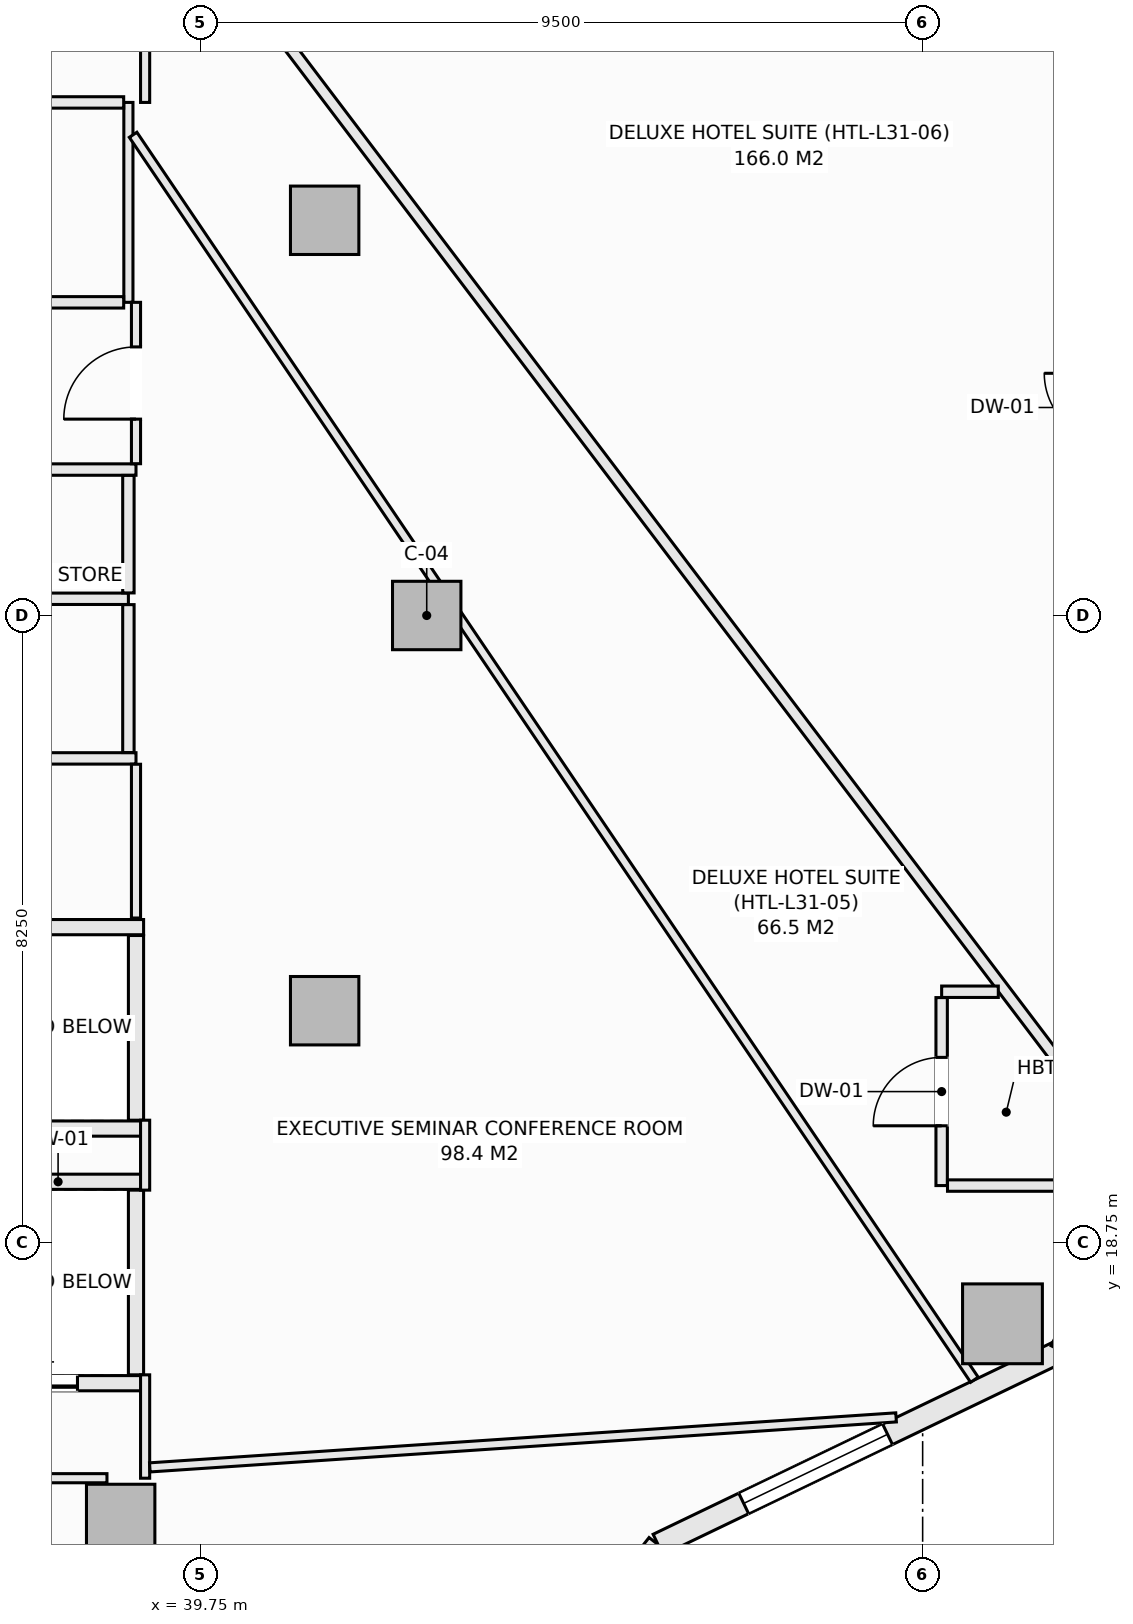
"""IFC4 building model, lengths in metres.
Left out: names, types, materials, properties, quantities, classifications, styles, units other than length and angle.
Written with IfcOpenShell. Run it as: python <this file> out.ifc"""

import sys

from ifc_helpers import new_model, si_unit, direction, frame, frame_2d, origin, origin_2d, place, context, subcontext, project, spatial, rectangle, extrude, element, fill, save


model = new_model("IFC4")
c1 = context("Model", 3, precision=1e-05, world=origin(), true_north=direction((0.0, 1.0)))
c2 = subcontext(c1, "Body", "Model", "MODEL_VIEW")
j1 = project(units=[si_unit("LENGTHUNIT", "METRE"), si_unit("PLANEANGLEUNIT", "RADIAN")], contexts=[c1])
p1 = place(None, origin())
s1 = spatial("IfcSite", under=j1, at=p1, CompositionType="ELEMENT")
p2 = place(p1, origin())
s2 = spatial("IfcBuilding", under=s1, at=p2, CompositionType="ELEMENT")
p3 = place(p2, frame((0.0, 0.0, 125.7)))
s3 = spatial("IfcBuildingStorey", under=s2, at=p3, CompositionType="ELEMENT", Elevation=125.7)
p4 = place(p3, frame((50.3, 17.681, -0.27), z_axis=(0.0, 0.0, 1.0), x_axis=(1.0, 0.0, 0.0)))
e1 = element("IfcColumn", 1, at=p4, inside=s3, PredefinedType="COLUMN", context=c2, shape_type="SweptSolid", body=[
    extrude(rectangle(XDim=1.05, YDim=1.05, at=origin_2d()), origin(), (0.0, 0.0, 1.0), 3.4),
])
for number, where, z_axis, x_axis in (
    (2, (42.725, 27.0, -0.27), (0.0, 0.0, 1.0), (1.0, 0.0, 0.0)),
    (3, (41.382, 32.199, -0.27), (0.0, 0.0, 1.0), (1.0, 0.0, 0.0)),
    (4, (38.698, 15.121, -0.27), (0.0, 0.0, 1.0), (1.0, 0.0, 0.0)),
    (5, (41.382, 21.801, -0.27), (0.0, 0.0, 1.0), (1.0, 0.0, 0.0)),
):
    element("IfcColumn", number, at=place(p3, frame(where, z_axis=z_axis, x_axis=x_axis)), inside=s3, PredefinedType="COLUMN", context=c2, shape_type="SweptSolid", body=[
        extrude(rectangle(XDim=0.9, YDim=0.9, at=origin_2d()), origin(), (0.0, 0.0, 1.0), 3.4),
    ])
p5 = place(p3, frame((51.072, 36.675, 0.0), z_axis=(0.0, 0.0, 1.0), x_axis=(0.459767899643, -0.888039119892, 0.0)))
e6 = element("IfcWall", 6, at=p5, inside=s3, PredefinedType="SOLIDWALL", context=c2, shape_type="SweptSolid", body=[
    extrude(rectangle(XDim=5.255, YDim=0.3, at=frame_2d((2.628, 0.0))), origin(), (0.0, 0.0, 1.0), 2.653),
])
p6 = place(p5, frame((1.578, 0.0, 0.74)))
e7 = element("IfcOpeningElement", 7, at=p6, cuts=e6, PredefinedType="OPENING", context=c2, shape_type="SweptSolid", body=[
    extrude(rectangle(XDim=2.1, YDim=1.7, at=frame_2d((1.05, 0.85))), frame((0.0, 0.16, 0.0), z_axis=(0.0, -1.0, 0.0), x_axis=(1.0, 0.0, 0.0)), (0.0, 0.0, 1.0), 0.32),
])
p7 = place(p3, frame((42.219, 10.242, 0.0), z_axis=(0.0, 0.0, 1.0), x_axis=(0.616435134162, 0.787405693001, 0.0)))
e8 = element("IfcWall", 8, at=p7, inside=s3, PredefinedType="SOLIDWALL", context=c2, shape_type="SweptSolid", body=[
    extrude(rectangle(XDim=5.759, YDim=0.3, at=frame_2d((2.879, 0.0))), origin(), (0.0, 0.0, 1.0), 2.653),
])
p8 = place(p7, frame((1.829, 0.0, 0.74)))
e9 = element("IfcOpeningElement", 9, at=p8, cuts=e8, PredefinedType="OPENING", context=c2, shape_type="SweptSolid", body=[
    extrude(rectangle(XDim=2.1, YDim=1.7, at=frame_2d((1.05, 0.85))), frame((0.0, 0.16, 0.0), z_axis=(0.0, -1.0, 0.0), x_axis=(1.0, 0.0, 0.0)), (0.0, 0.0, 1.0), 0.32),
])
p9 = place(p3, frame((45.769, 14.777, 0.0), z_axis=(0.0, 0.0, 1.0), x_axis=(0.901370184739, 0.433049408339, 0.0)))
e10 = element("IfcWall", 10, at=p9, inside=s3, PredefinedType="SOLIDWALL", context=c2, shape_type="SweptSolid", body=[
    extrude(rectangle(XDim=5.884, YDim=0.3, at=frame_2d((2.942, 0.0))), origin(), (0.0, 0.0, 1.0), 2.653),
])
p10 = place(p9, frame((1.25, 0.0, 0.74)))
e11 = element("IfcOpeningElement", 11, at=p10, cuts=e10, PredefinedType="OPENING", context=c2, shape_type="SweptSolid", body=[
    extrude(rectangle(XDim=2.1, YDim=1.7, at=frame_2d((1.05, 0.85))), frame((0.0, 0.16, 0.0), z_axis=(0.0, -1.0, 0.0), x_axis=(1.0, 0.0, 0.0)), (0.0, 0.0, 1.0), 0.32),
])
p11 = place(p3, frame((51.072, 17.325, 0.0), z_axis=(0.0, 0.0, 1.0), x_axis=(0.459767899643, 0.888039119892, 0.0)))
e12 = element("IfcWall", 12, at=p11, inside=s3, PredefinedType="SOLIDWALL", context=c2, shape_type="SweptSolid", body=[
    extrude(rectangle(XDim=5.255, YDim=0.3, at=frame_2d((2.628, 0.0))), origin(), (0.0, 0.0, 1.0), 2.653),
])
p12 = place(p11, frame((2.98, 0.0, 0.72)))
e13 = element("IfcOpeningElement", 13, at=p12, cuts=e12, PredefinedType="OPENING", context=c2, shape_type="SweptSolid", body=[
    extrude(rectangle(XDim=1.2, YDim=1.65, at=frame_2d((0.6, 0.825))), frame((0.0, 0.16, 0.0), z_axis=(0.0, -1.0, 0.0), x_axis=(1.0, 0.0, 0.0)), (0.0, 0.0, 1.0), 0.32),
])
p13 = place(p11, frame((0.22, 0.0, 0.72)))
e14 = element("IfcOpeningElement", 14, at=p13, cuts=e12, PredefinedType="OPENING", context=c2, shape_type="SweptSolid", body=[
    extrude(rectangle(XDim=1.2, YDim=1.65, at=frame_2d((0.6, 0.825))), frame((0.0, 0.16, 0.0), z_axis=(0.0, -1.0, 0.0), x_axis=(1.0, 0.0, 0.0)), (0.0, 0.0, 1.0), 0.32),
])
p14 = place(p3, frame((36.75, 19.55, 0.0), z_axis=(0.0, 0.0, 1.0), x_axis=(1.0, 0.0, 0.0)))
e15 = element("IfcWall", 15, at=p14, inside=s3, PredefinedType="SOLIDWALL", context=c2, shape_type="SweptSolid", body=[
    extrude(rectangle(XDim=2.25, YDim=0.2, at=frame_2d((1.125, 0.0))), origin(), (0.0, 0.0, 1.0), 3.13),
])
p15 = place(p3, frame((36.75, 16.9, 0.0), z_axis=(0.0, 0.0, 1.0), x_axis=(1.0, 0.0, 0.0)))
e16 = element("IfcWall", 16, at=p15, inside=s3, PredefinedType="SOLIDWALL", context=c2, shape_type="SweptSolid", body=[
    extrude(rectangle(XDim=2.25, YDim=0.2, at=frame_2d((1.125, 0.0))), origin(), (0.0, 0.0, 1.0), 3.13),
])
p16 = place(p15, frame((0.28, 0.0, 0.0)))
e17 = element("IfcOpeningElement", 17, at=p16, cuts=e16, PredefinedType="OPENING", context=c2, shape_type="SweptSolid", body=[
    extrude(rectangle(XDim=1.1, YDim=2.2, at=frame_2d((0.55, 1.1))), frame((0.0, 0.11, 0.0), z_axis=(0.0, -1.0, 0.0), x_axis=(1.0, 0.0, 0.0)), (0.0, 0.0, 1.0), 0.22),
])
p17 = place(p3, frame((38.9, 17.01, 0.0), z_axis=(0.0, 0.0, 1.0), x_axis=(0.0, 1.0, 0.0)))
e18 = element("IfcWall", 18, at=p17, inside=s3, PredefinedType="SOLIDWALL", context=c2, shape_type="SweptSolid", body=[
    extrude(rectangle(XDim=2.43, YDim=0.2, at=frame_2d((1.215, 0.0))), origin(), (0.0, 0.0, 1.0), 3.13),
])
for number, where, z_axis, x_axis in (
    (19, (36.75, 22.9, 0.0), (0.0, 0.0, 1.0), (1.0, 0.0, 0.0)),
    (20, (36.75, 20.25, 0.0), (0.0, 0.0, 1.0), (1.0, 0.0, 0.0)),
):
    element("IfcWall", number, at=place(p3, frame(where, z_axis=z_axis, x_axis=x_axis)), inside=s3, PredefinedType="SOLIDWALL", context=c2, shape_type="SweptSolid", body=[
        extrude(rectangle(XDim=2.25, YDim=0.2, at=frame_2d((1.125, 0.0))), origin(), (0.0, 0.0, 1.0), 3.13),
    ])
p18 = place(p3, frame((38.9, 20.36, 0.0), z_axis=(0.0, 0.0, 1.0), x_axis=(0.0, 1.0, 0.0)))
e21 = element("IfcWall", 21, at=p18, inside=s3, PredefinedType="SOLIDWALL", context=c2, shape_type="SweptSolid", body=[
    extrude(rectangle(XDim=2.43, YDim=0.2, at=frame_2d((1.215, 0.0))), origin(), (0.0, 0.0, 1.0), 3.13),
])
p19 = place(p3, frame((30.077, 28.92, 0.0), z_axis=(0.0, 0.0, 1.0), x_axis=(1.0, 0.0, 0.0)))
e22 = element("IfcWall", 22, at=p19, inside=s3, PredefinedType="PARTITIONING", context=c2, shape_type="SweptSolid", body=[
    extrude(rectangle(XDim=8.823, YDim=0.15, at=frame_2d((4.412, 0.0))), origin(), (0.0, 0.0, 1.0), 3.13),
])
p20 = place(p19, frame((1.342, 0.0, 0.0)))
e23 = element("IfcOpeningElement", 23, at=p20, cuts=e22, PredefinedType="OPENING", context=c2, shape_type="SweptSolid", body=[
    extrude(rectangle(XDim=0.95, YDim=2.1, at=frame_2d((0.475, 1.05))), frame((0.0, 0.085, 0.0), z_axis=(0.0, -1.0, 0.0), x_axis=(1.0, 0.0, 0.0)), (0.0, 0.0, 1.0), 0.17),
])
p21 = place(p19, frame((5.343, 0.0, 0.0)))
e24 = element("IfcOpeningElement", 24, at=p21, cuts=e22, PredefinedType="OPENING", context=c2, shape_type="SweptSolid", body=[
    extrude(rectangle(XDim=0.95, YDim=2.1, at=frame_2d((0.475, 1.05))), frame((0.0, 0.085, 0.0), z_axis=(0.0, -1.0, 0.0), x_axis=(1.0, 0.0, 0.0)), (0.0, 0.0, 1.0), 0.17),
])
p22 = place(p3, frame((33.377, 25.12, 0.0), z_axis=(0.0, 0.0, 1.0), x_axis=(1.0, 0.0, 0.0)))
e25 = element("IfcWall", 25, at=p22, inside=s3, PredefinedType="PARTITIONING", context=c2, shape_type="SweptSolid", body=[
    extrude(rectangle(XDim=5.523, YDim=0.15, at=frame_2d((2.761, 0.0))), origin(), (0.0, 0.0, 1.0), 3.13),
])
p23 = place(p22, frame((2.287, 0.0, 0.0)))
e26 = element("IfcOpeningElement", 26, at=p23, cuts=e25, PredefinedType="OPENING", context=c2, shape_type="SweptSolid", body=[
    extrude(rectangle(XDim=0.95, YDim=2.1, at=frame_2d((0.475, 1.05))), frame((0.0, 0.085, 0.0), z_axis=(0.0, -1.0, 0.0), x_axis=(1.0, 0.0, 0.0)), (0.0, 0.0, 1.0), 0.17),
])
p24 = place(p3, frame((33.377, 27.22, 0.0), z_axis=(0.0, 0.0, 1.0), x_axis=(1.0, 0.0, 0.0)))
e27 = element("IfcWall", 27, at=p24, inside=s3, PredefinedType="PARTITIONING", context=c2, shape_type="SweptSolid", body=[
    extrude(rectangle(XDim=5.423, YDim=0.15, at=frame_2d((2.711, 0.0))), origin(), (0.0, 0.0, 1.0), 3.13),
])
p25 = place(p3, frame((38.8, 25.197, 0.0), z_axis=(0.0, 0.0, 1.0), x_axis=(0.0, 1.0, 0.0)))
e28 = element("IfcWall", 28, at=p25, inside=s3, PredefinedType="PARTITIONING", context=c2, shape_type="SweptSolid", body=[
    extrude(rectangle(XDim=1.946, YDim=0.15, at=frame_2d((0.973, 0.0))), origin(), (0.0, 0.0, 1.0), 3.13),
])
p26 = place(p3, frame((38.8, 27.297, 0.0), z_axis=(0.0, 0.0, 1.0), x_axis=(0.0, 1.0, 0.0)))
e29 = element("IfcWall", 29, at=p26, inside=s3, PredefinedType="PARTITIONING", context=c2, shape_type="SweptSolid", body=[
    extrude(rectangle(XDim=1.546, YDim=0.15, at=frame_2d((0.773, 0.0))), origin(), (0.0, 0.0, 1.0), 3.13),
])
p27 = place(p3, frame((38.8, 31.12, 0.0), z_axis=(0.0, 0.0, 1.0), x_axis=(0.0, 1.0, 0.0)))
e30 = element("IfcWall", 30, at=p27, inside=s3, PredefinedType="PARTITIONING", context=c2, shape_type="SweptSolid", body=[
    extrude(rectangle(XDim=2.63, YDim=0.12, at=frame_2d((1.315, 0.0))), origin(), (0.0, 0.0, 1.0), 3.13),
])
p28 = place(p3, frame((30.077, 31.12, 0.0), z_axis=(0.0, 0.0, 1.0), x_axis=(1.0, 0.0, 0.0)))
e31 = element("IfcWall", 31, at=p28, inside=s3, PredefinedType="PARTITIONING", context=c2, shape_type="SweptSolid", body=[
    extrude(rectangle(XDim=8.661, YDim=0.15, at=frame_2d((4.331, 0.0))), origin(), (0.0, 0.0, 1.0), 3.13),
])
p29 = place(p28, frame((1.892, 0.0, 0.0)))
e32 = element("IfcOpeningElement", 32, at=p29, cuts=e31, PredefinedType="OPENING", context=c2, shape_type="SweptSolid", body=[
    extrude(rectangle(XDim=0.95, YDim=2.1, at=frame_2d((0.475, 1.05))), frame((0.0, 0.085, 0.0), z_axis=(0.0, -1.0, 0.0), x_axis=(1.0, 0.0, 0.0)), (0.0, 0.0, 1.0), 0.17),
])
p30 = place(p28, frame((5.812, 0.0, 0.0)))
e33 = element("IfcOpeningElement", 33, at=p30, cuts=e31, PredefinedType="OPENING", context=c2, shape_type="SweptSolid", body=[
    extrude(rectangle(XDim=0.95, YDim=2.1, at=frame_2d((0.475, 1.05))), frame((0.0, 0.085, 0.0), z_axis=(0.0, -1.0, 0.0), x_axis=(1.0, 0.0, 0.0)), (0.0, 0.0, 1.0), 0.17),
])
p31 = place(p3, frame((30.077, 33.75, 0.0), z_axis=(0.0, 0.0, 1.0), x_axis=(1.0, 0.0, 0.0)))
e34 = element("IfcWall", 34, at=p31, inside=s3, PredefinedType="PARTITIONING", context=c2, shape_type="SweptSolid", body=[
    extrude(rectangle(XDim=8.661, YDim=0.15, at=frame_2d((4.331, 0.0))), origin(), (0.0, 0.0, 1.0), 3.13),
])
p32 = place(p3, frame((39.02, 15.65, 0.0), z_axis=(0.0, 0.0, 1.0), x_axis=(0.0, 1.0, 0.0)))
e35 = element("IfcWall", 35, at=p32, inside=s3, PredefinedType="PARTITIONING", context=c2, shape_type="SweptSolid", body=[
    extrude(rectangle(XDim=1.36, YDim=0.12, at=frame_2d((0.68, 0.0))), origin(), (0.0, 0.0, 1.0), 2.505),
])
p33 = place(p3, frame((39.02, 19.44, 0.0), z_axis=(0.0, 0.0, 1.0), x_axis=(0.0, 1.0, 0.0)))
e36 = element("IfcWall", 36, at=p33, inside=s3, PredefinedType="PARTITIONING", context=c2, shape_type="SweptSolid", body=[
    extrude(rectangle(XDim=0.92, YDim=0.12, at=frame_2d((0.46, 0.0))), origin(), (0.0, 0.0, 1.0), 3.13),
])
p34 = place(p3, frame((39.02, 33.75, 0.0), z_axis=(0.0, 0.0, 1.0), x_axis=(0.0, 1.0, 0.0)))
e37 = element("IfcWall", 37, at=p34, inside=s3, PredefinedType="PARTITIONING", context=c2, shape_type="SweptSolid", body=[
    extrude(rectangle(XDim=2.0, YDim=0.12, at=frame_2d((1.0, 0.0))), origin(), (0.0, 0.0, 1.0), 3.13),
])
p35 = place(p3, frame((35.95, 15.65, 0.0), z_axis=(0.0, 0.0, 1.0), x_axis=(1.0, 0.0, 0.0)))
e38 = element("IfcWall", 38, at=p35, inside=s3, PredefinedType="PARTITIONING", context=c2, shape_type="SweptSolid", body=[
    extrude(rectangle(XDim=2.568, YDim=0.12, at=frame_2d((1.284, 0.0))), origin(), (0.0, 0.0, 1.0), 3.13),
])
p36 = place(p3, frame((38.9, 23.02, 0.0), z_axis=(0.0, 0.0, 1.0), x_axis=(0.0, 1.0, 0.0)))
e39 = element("IfcWall", 39, at=p36, inside=s3, PredefinedType="PARTITIONING", context=c2, shape_type="SweptSolid", body=[
    extrude(rectangle(XDim=2.023, YDim=0.12, at=frame_2d((1.011, 0.0))), origin(), (0.0, 0.0, 1.0), 3.13),
])
p37 = place(p3, frame((38.9, 28.997, 0.0), z_axis=(0.0, 0.0, 1.0), x_axis=(0.0, 1.0, 0.0)))
e40 = element("IfcWall", 40, at=p37, inside=s3, PredefinedType="PARTITIONING", context=c2, shape_type="SweptSolid", body=[
    extrude(rectangle(XDim=2.123, YDim=0.12, at=frame_2d((1.062, 0.0))), origin(), (0.0, 0.0, 1.0), 3.13),
])
p38 = place(p37, frame((0.586, 0.0, 0.0)))
e41 = element("IfcOpeningElement", 41, at=p38, cuts=e40, PredefinedType="OPENING", context=c2, shape_type="SweptSolid", body=[
    extrude(rectangle(XDim=0.95, YDim=2.1, at=frame_2d((0.475, 1.05))), frame((0.0, 0.07, 0.0), z_axis=(0.0, -1.0, 0.0), x_axis=(1.0, 0.0, 0.0)), (0.0, 0.0, 1.0), 0.14),
])
p39 = place(p3, frame((39.082, 15.792, 0.0), z_axis=(0.0, 0.0, 1.0), x_axis=(0.997763809534, 0.066838464862, 0.0)))
e42 = element("IfcWall", 42, at=p39, inside=s3, PredefinedType="PARTITIONING", context=c2, shape_type="SweptSolid", body=[
    extrude(rectangle(XDim=9.84, YDim=0.12, at=frame_2d((4.92, 0.0))), origin(), (0.0, 0.0, 1.0), 2.653),
])
p40 = place(p3, frame((38.862, 33.324, 0.0), z_axis=(0.0, 0.0, 1.0), x_axis=(0.55994174094, -0.828531982939, 0.0)))
e43 = element("IfcWall", 43, at=p40, inside=s3, PredefinedType="PARTITIONING", context=c2, shape_type="SweptSolid", body=[
    extrude(rectangle(XDim=19.768, YDim=0.12, at=frame_2d((9.884, 0.0))), origin(), (0.0, 0.0, 1.0), 2.505),
])
p41 = place(p3, frame((36.368, 40.488, 0.0), z_axis=(0.0, 0.0, 1.0), x_axis=(0.604016753865, -0.796971618723, 0.0)))
e44 = element("IfcWall", 44, at=p41, inside=s3, PredefinedType="PARTITIONING", context=c2, shape_type="SweptSolid", body=[
    extrude(rectangle(XDim=26.091, YDim=0.15, at=frame_2d((13.046, 0.0))), origin(), (0.0, 0.0, 1.0), 3.13),
])
p42 = place(p3, frame((49.5, 22.05, 0.0), z_axis=(0.0, 0.0, 1.0), x_axis=(1.0, 0.0, 0.0)))
e45 = element("IfcWall", 45, at=p42, inside=s3, PredefinedType="PARTITIONING", context=c2, shape_type="SweptSolid", body=[
    extrude(rectangle(XDim=0.745, YDim=0.15, at=frame_2d((0.373, 0.0))), origin(), (0.0, 0.0, 1.0), 3.13),
])
p43 = place(p3, frame((49.5, 19.5, 0.0), z_axis=(0.0, 0.0, 1.0), x_axis=(0.0, 1.0, 0.0)))
e46 = element("IfcWall", 46, at=p43, inside=s3, PredefinedType="PARTITIONING", context=c2, shape_type="SweptSolid", body=[
    extrude(rectangle(XDim=2.473, YDim=0.15, at=frame_2d((1.236, 0.0))), origin(), (0.0, 0.0, 1.0), 3.13),
])
p44 = place(p43, frame((0.787, 0.0, 0.0)))
e47 = element("IfcOpeningElement", 47, at=p44, cuts=e46, PredefinedType="OPENING", context=c2, shape_type="SweptSolid", body=[
    extrude(rectangle(XDim=0.9, YDim=2.1, at=frame_2d((0.45, 1.05))), frame((0.0, 0.085, 0.0), z_axis=(0.0, -1.0, 0.0), x_axis=(1.0, 0.0, 0.0)), (0.0, 0.0, 1.0), 0.17),
])
p45 = place(p3, frame((49.577, 19.5, 0.0), z_axis=(0.0, 0.0, 1.0), x_axis=(1.0, 0.0, 0.0)))
e48 = element("IfcWall", 48, at=p45, inside=s3, PredefinedType="PARTITIONING", context=c2, shape_type="SweptSolid", body=[
    extrude(rectangle(XDim=2.45, YDim=0.15, at=frame_2d((1.225, 0.0))), origin(), (0.0, 0.0, 1.0), 3.13),
])
p46 = place(p10, origin())
e49 = element("IfcWindow", 49, at=p46, inside=s3, PartitioningType="SINGLE_PANEL", PredefinedType="WINDOW", context=c2, shape_type="SweptSolid", body=[
    extrude(rectangle(XDim=2.1, YDim=1.7, at=frame_2d((1.05, 0.85))), frame((0.0, 0.03, 0.0), z_axis=(0.0, -1.0, 0.0), x_axis=(1.0, 0.0, 0.0)), (0.0, 0.0, 1.0), 0.06),
])
fill(e11, e49)
p47 = place(p16, origin())
e50 = element("IfcDoor", 50, at=p47, inside=s3, OperationType="SLIDING_TO_LEFT", PredefinedType="DOOR", context=c2, shape_type="SweptSolid", body=[
    extrude(rectangle(XDim=1.1, YDim=2.2, at=frame_2d((0.55, 1.1))), frame((0.0, 0.025, 0.0), z_axis=(0.0, -1.0, 0.0), x_axis=(1.0, 0.0, 0.0)), (0.0, 0.0, 1.0), 0.05),
])
fill(e17, e50)
p48 = place(p38, origin())
e51 = element("IfcDoor", 51, at=p48, inside=s3, OperationType="SINGLE_SWING_LEFT", PredefinedType="DOOR", context=c2, shape_type="SweptSolid", body=[
    extrude(rectangle(XDim=0.95, YDim=2.1, at=frame_2d((0.475, 1.05))), frame((0.0, 0.025, 0.0), z_axis=(0.0, -1.0, 0.0), x_axis=(1.0, 0.0, 0.0)), (0.0, 0.0, 1.0), 0.05),
])
fill(e41, e51)
p49 = place(p44, origin())
e52 = element("IfcDoor", 52, at=p49, inside=s3, OperationType="SINGLE_SWING_LEFT", PredefinedType="DOOR", context=c2, shape_type="SweptSolid", body=[
    extrude(rectangle(XDim=0.9, YDim=2.1, at=frame_2d((0.45, 1.05))), frame((0.0, 0.025, 0.0), z_axis=(0.0, -1.0, 0.0), x_axis=(1.0, 0.0, 0.0)), (0.0, 0.0, 1.0), 0.05),
])
fill(e47, e52)
save(model, sys.argv[1])
